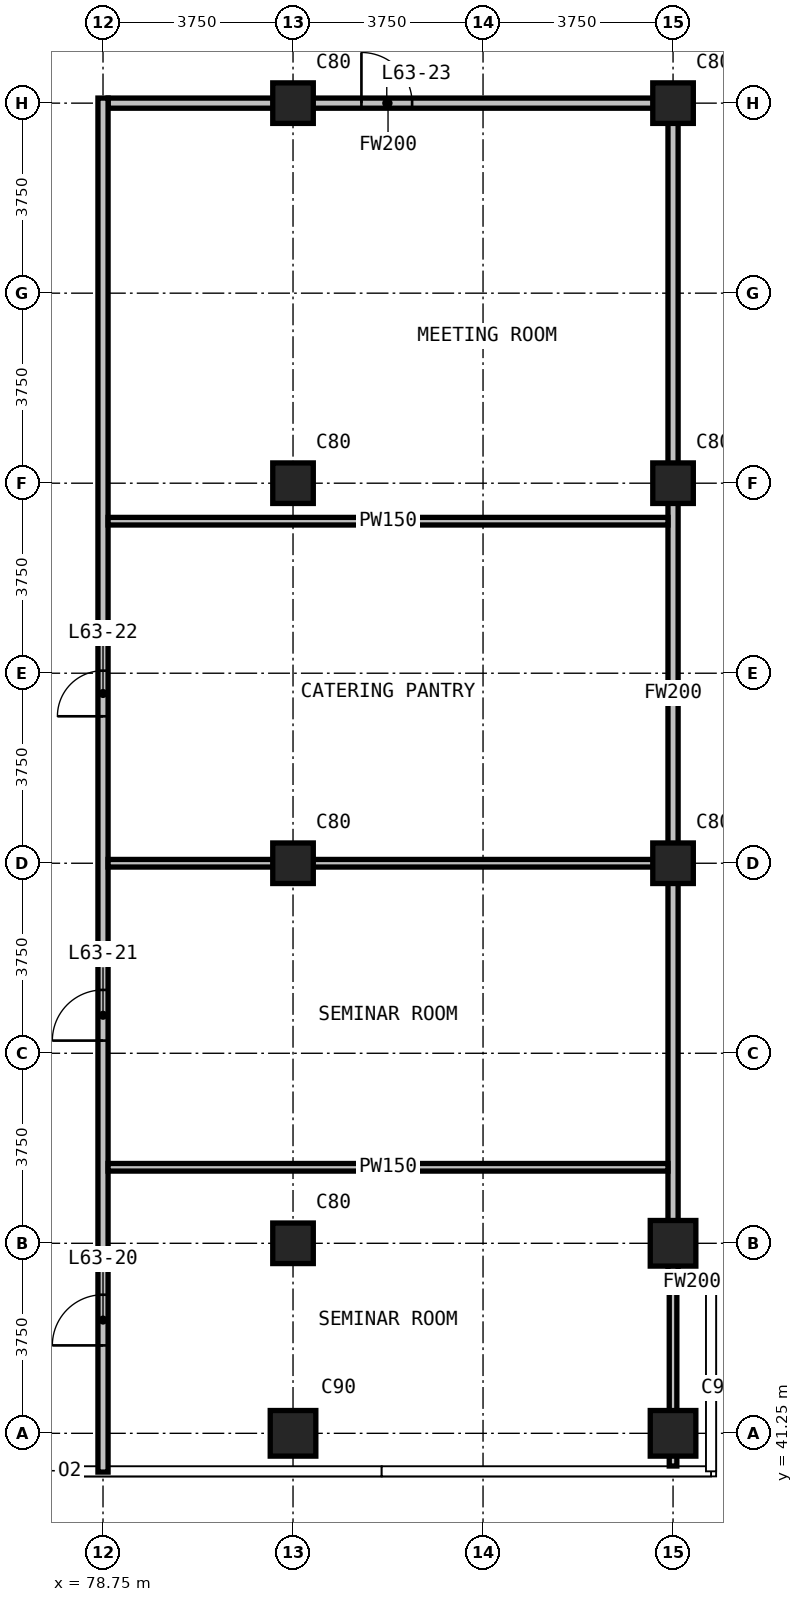
"""IFC4 building model, lengths in metres.
Left out: names, types, materials, properties, quantities, classifications, styles, units other than length and angle.
Written with IfcOpenShell. Run it as: python <this file> out.ifc"""

import sys

from ifc_helpers import new_model, si_unit, direction, frame, frame_2d, origin, origin_2d, place, context, subcontext, project, spatial, rectangle, extrude, element, fill, save


model = new_model("IFC4")
c1 = context("Model", 3, precision=1e-05, world=origin(), true_north=direction((0.0, 1.0)))
c2 = subcontext(c1, "Body", "Model", "MODEL_VIEW")
j1 = project(units=[si_unit("LENGTHUNIT", "METRE"), si_unit("PLANEANGLEUNIT", "RADIAN")], contexts=[c1])
p1 = place(None, origin())
s1 = spatial("IfcSite", under=j1, at=p1, CompositionType="ELEMENT")
p2 = place(p1, origin())
s2 = spatial("IfcBuilding", under=s1, at=p2, CompositionType="ELEMENT")
p3 = place(p2, frame((0.0, 0.0, 242.7)))
s3 = spatial("IfcBuildingStorey", under=s2, at=p3, CompositionType="ELEMENT", Elevation=242.7)
p4 = place(p3, frame((82.5, 41.25, 0.0), z_axis=(0.0, 0.0, 1.0), x_axis=(1.0, 0.0, 0.0)))
e1 = element("IfcColumn", 1, at=p4, inside=s3, PredefinedType="COLUMN", context=c2, shape_type="SweptSolid", body=[
    extrude(rectangle(XDim=0.9, YDim=0.9, at=origin_2d()), origin(), (0.0, 0.0, 1.0), 3.6),
])
for number, where, z_axis, x_axis in (
    (2, (82.5, 45.0, 0.0), (0.0, 0.0, 1.0), (1.0, 0.0, 0.0)),
    (3, (82.5, 52.5, 0.0), (0.0, 0.0, 1.0), (1.0, 0.0, 0.0)),
    (4, (82.5, 60.0, 0.0), (0.0, 0.0, 1.0), (1.0, 0.0, 0.0)),
    (5, (82.5, 67.5, 0.0), (0.0, 0.0, 1.0), (1.0, 0.0, 0.0)),
):
    element("IfcColumn", number, at=place(p3, frame(where, z_axis=z_axis, x_axis=x_axis)), inside=s3, PredefinedType="COLUMN", context=c2, shape_type="SweptSolid", body=[
        extrude(rectangle(XDim=0.8, YDim=0.8, at=origin_2d()), origin(), (0.0, 0.0, 1.0), 3.6),
    ])
for number, where, z_axis, x_axis in (
    (6, (90.0, 41.25, 0.0), (0.0, 0.0, 1.0), (1.0, 0.0, 0.0)),
    (7, (90.0, 45.0, 0.0), (0.0, 0.0, 1.0), (1.0, 0.0, 0.0)),
):
    element("IfcColumn", number, at=place(p3, frame(where, z_axis=z_axis, x_axis=x_axis)), inside=s3, PredefinedType="COLUMN", context=c2, shape_type="SweptSolid", body=[
        extrude(rectangle(XDim=0.9, YDim=0.9, at=origin_2d()), origin(), (0.0, 0.0, 1.0), 3.6),
    ])
for number, where, z_axis, x_axis in (
    (8, (90.0, 52.5, 0.0), (0.0, 0.0, 1.0), (1.0, 0.0, 0.0)),
    (9, (90.0, 60.0, 0.0), (0.0, 0.0, 1.0), (1.0, 0.0, 0.0)),
    (10, (90.0, 67.5, 0.0), (0.0, 0.0, 1.0), (1.0, 0.0, 0.0)),
):
    element("IfcColumn", number, at=place(p3, frame(where, z_axis=z_axis, x_axis=x_axis)), inside=s3, PredefinedType="COLUMN", context=c2, shape_type="SweptSolid", body=[
        extrude(rectangle(XDim=0.8, YDim=0.8, at=origin_2d()), origin(), (0.0, 0.0, 1.0), 3.6),
    ])
p5 = place(p3, frame((90.1, 44.235, 0.0), z_axis=(0.0, 0.0, 1.0), x_axis=(1.0, 0.0, 0.0)))
e11 = element("IfcWall", 11, at=p5, inside=s3, PredefinedType="PARTITIONING", context=c2, shape_type="SweptSolid", body=[
    extrude(rectangle(XDim=0.545, YDim=0.2, at=frame_2d((0.272, 0.0))), origin(), (0.0, 0.0, 1.0), 3.3),
])
p6 = place(p3, frame((78.85, 67.5, 0.0), z_axis=(0.0, 0.0, 1.0), x_axis=(1.0, 0.0, 0.0)))
e12 = element("IfcWall", 12, at=p6, inside=s3, PredefinedType="PARTITIONING", context=c2, shape_type="SweptSolid", body=[
    extrude(rectangle(XDim=11.05, YDim=0.2, at=frame_2d((5.525, 0.0))), origin(), (0.0, 0.0, 1.0), 3.3),
])
p7 = place(p6, frame((5.0, 0.0, 0.0)))
e13 = element("IfcOpeningElement", 13, at=p7, cuts=e12, PredefinedType="OPENING", context=c2, shape_type="SweptSolid", body=[
    extrude(rectangle(XDim=1.0, YDim=2.2, at=frame_2d((0.5, 1.1))), frame((0.0, 0.11, 0.0), z_axis=(0.0, -1.0, 0.0), x_axis=(1.0, 0.0, 0.0)), (0.0, 0.0, 1.0), 0.22),
])
p8 = place(p3, frame((78.75, 40.485, 0.0), z_axis=(0.0, 0.0, 1.0), x_axis=(0.0, 1.0, 0.0)))
e14 = element("IfcWall", 14, at=p8, inside=s3, PredefinedType="PARTITIONING", context=c2, shape_type="SweptSolid", body=[
    extrude(rectangle(XDim=27.115, YDim=0.2, at=frame_2d((13.558, 0.0))), origin(), (0.0, 0.0, 1.0), 3.3),
])
p9 = place(p8, frame((2.5, 0.0, 0.0)))
e15 = element("IfcOpeningElement", 15, at=p9, cuts=e14, PredefinedType="OPENING", context=c2, shape_type="SweptSolid", body=[
    extrude(rectangle(XDim=1.0, YDim=2.2, at=frame_2d((0.5, 1.1))), frame((0.0, 0.11, 0.0), z_axis=(0.0, -1.0, 0.0), x_axis=(1.0, 0.0, 0.0)), (0.0, 0.0, 1.0), 0.22),
])
p10 = place(p8, frame((8.515, 0.0, 0.0)))
e16 = element("IfcOpeningElement", 16, at=p10, cuts=e14, PredefinedType="OPENING", context=c2, shape_type="SweptSolid", body=[
    extrude(rectangle(XDim=1.0, YDim=2.2, at=frame_2d((0.5, 1.1))), frame((0.0, 0.11, 0.0), z_axis=(0.0, -1.0, 0.0), x_axis=(1.0, 0.0, 0.0)), (0.0, 0.0, 1.0), 0.22),
])
p11 = place(p8, frame((14.915, 0.0, 0.0)))
e17 = element("IfcOpeningElement", 17, at=p11, cuts=e14, PredefinedType="OPENING", context=c2, shape_type="SweptSolid", body=[
    extrude(rectangle(XDim=0.9, YDim=2.2, at=frame_2d((0.45, 1.1))), frame((0.0, 0.11, 0.0), z_axis=(0.0, -1.0, 0.0), x_axis=(1.0, 0.0, 0.0)), (0.0, 0.0, 1.0), 0.22),
])
p12 = place(p3, frame((90.0, 44.135, 0.0), z_axis=(0.0, 0.0, 1.0), x_axis=(0.0, 1.0, 0.0)))
e18 = element("IfcWall", 18, at=p12, inside=s3, PredefinedType="PARTITIONING", context=c2, shape_type="SweptSolid", body=[
    extrude(rectangle(XDim=23.465, YDim=0.2, at=frame_2d((11.732, 0.0))), origin(), (0.0, 0.0, 1.0), 3.3),
])
for number, where, z_axis, x_axis in (
    (19, (78.85, 46.5, 0.0), (0.0, 0.0, 1.0), (1.0, 0.0, 0.0)),
    (20, (78.85, 52.5, 0.0), (0.0, 0.0, 1.0), (1.0, 0.0, 0.0)),
    (21, (78.85, 59.25, 0.0), (0.0, 0.0, 1.0), (1.0, 0.0, 0.0)),
):
    element("IfcWall", number, at=place(p3, frame(where, z_axis=z_axis, x_axis=x_axis)), inside=s3, PredefinedType="PARTITIONING", context=c2, shape_type="SweptSolid", body=[
        extrude(rectangle(XDim=11.05, YDim=0.15, at=frame_2d((5.525, 0.0))), origin(), (0.0, 0.0, 1.0), 3.3),
    ])
p13 = place(p3, frame((90.0, 40.605, 0.0), z_axis=(0.0, 0.0, 1.0), x_axis=(0.0, 1.0, 0.0)))
e22 = element("IfcWall", 22, at=p13, inside=s3, PredefinedType="PARTITIONING", context=c2, shape_type="SweptSolid", body=[
    extrude(rectangle(XDim=3.6, YDim=0.15, at=frame_2d((1.8, 0.0))), origin(), (0.0, 0.0, 1.0), 3.3),
])
p14 = place(p9, origin())
e23 = element("IfcDoor", 23, at=p14, inside=s3, OperationType="SINGLE_SWING_LEFT", PredefinedType="DOOR", context=c2, shape_type="SweptSolid", body=[
    extrude(rectangle(XDim=1.0, YDim=2.2, at=frame_2d((0.5, 1.1))), frame((0.0, 0.025, 0.0), z_axis=(0.0, -1.0, 0.0), x_axis=(1.0, 0.0, 0.0)), (0.0, 0.0, 1.0), 0.05),
])
fill(e15, e23)
p15 = place(p10, origin())
e24 = element("IfcDoor", 24, at=p15, inside=s3, OperationType="SINGLE_SWING_LEFT", PredefinedType="DOOR", context=c2, shape_type="SweptSolid", body=[
    extrude(rectangle(XDim=1.0, YDim=2.2, at=frame_2d((0.5, 1.1))), frame((0.0, 0.025, 0.0), z_axis=(0.0, -1.0, 0.0), x_axis=(1.0, 0.0, 0.0)), (0.0, 0.0, 1.0), 0.05),
])
fill(e16, e24)
p16 = place(p11, origin())
e25 = element("IfcDoor", 25, at=p16, inside=s3, OperationType="SINGLE_SWING_LEFT", PredefinedType="DOOR", context=c2, shape_type="SweptSolid", body=[
    extrude(rectangle(XDim=0.9, YDim=2.2, at=frame_2d((0.45, 1.1))), frame((0.0, 0.025, 0.0), z_axis=(0.0, -1.0, 0.0), x_axis=(1.0, 0.0, 0.0)), (0.0, 0.0, 1.0), 0.05),
])
fill(e17, e25)
p17 = place(p7, origin())
e26 = element("IfcDoor", 26, at=p17, inside=s3, OperationType="SINGLE_SWING_LEFT", PredefinedType="DOOR", context=c2, shape_type="SweptSolid", body=[
    extrude(rectangle(XDim=1.0, YDim=2.2, at=frame_2d((0.5, 1.1))), frame((0.0, 0.025, 0.0), z_axis=(0.0, -1.0, 0.0), x_axis=(1.0, 0.0, 0.0)), (0.0, 0.0, 1.0), 0.05),
])
fill(e13, e26)
save(model, sys.argv[1])
